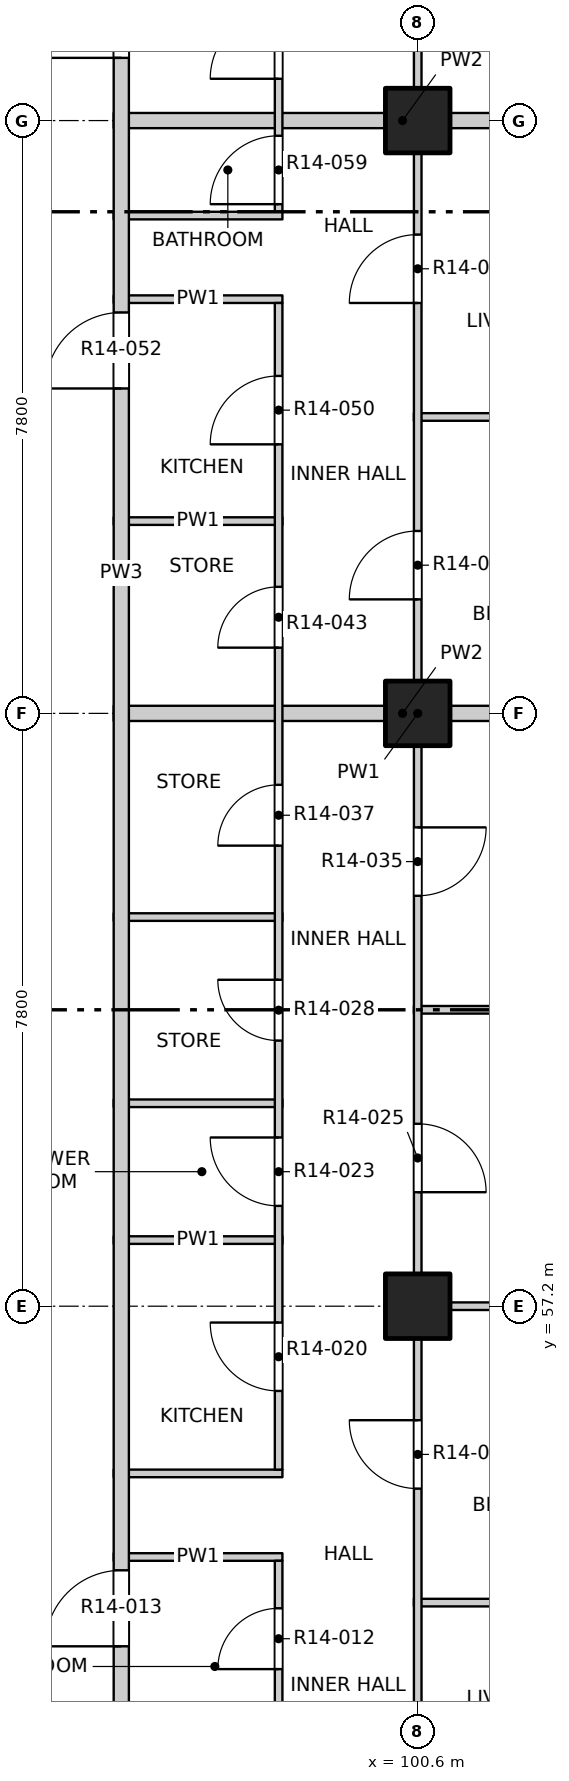
"""IFC4 building model, lengths in metres.
Left out: names, types, materials, properties, quantities, classifications, styles, units other than length and angle.
Written with IfcOpenShell. Run it as: python <this file> out.ifc"""

import sys

from ifc_helpers import new_model, si_unit, direction, frame, frame_2d, origin, origin_2d, place, context, subcontext, project, spatial, rectangle, extrude, element, fill, save


model = new_model("IFC4")
c1 = context("Model", 3, precision=1e-05, world=origin(), true_north=direction((0.0, 1.0)))
c2 = subcontext(c1, "Body", "Model", "MODEL_VIEW")
j1 = project(units=[si_unit("LENGTHUNIT", "METRE"), si_unit("PLANEANGLEUNIT", "RADIAN")], contexts=[c1])
p1 = place(None, origin())
s1 = spatial("IfcSite", under=j1, at=p1, CompositionType="ELEMENT")
p2 = place(p1, origin())
s2 = spatial("IfcBuilding", under=s1, at=p2, CompositionType="ELEMENT")
p3 = place(p2, frame((0.0, 0.0, 152.0)))
s3 = spatial("IfcBuildingStorey", under=s2, at=p3, CompositionType="ELEMENT", Elevation=152.0)
for number, where, z_axis, x_axis in (
    (1, (100.6, 57.2, -0.25), (0.0, 0.0, 1.0), (1.0, 0.0, 0.0)),
    (2, (100.6, 65.0, -0.25), (0.0, 0.0, 1.0), (1.0, 0.0, 0.0)),
    (3, (100.6, 72.8, -0.25), (0.0, 0.0, 1.0), (1.0, 0.0, 0.0)),
):
    element("IfcColumn", number, at=place(p3, frame(where, z_axis=z_axis, x_axis=x_axis)), inside=s3, PredefinedType="COLUMN", context=c2, shape_type="SweptSolid", body=[
        extrude(rectangle(XDim=0.85, YDim=0.85, at=origin_2d()), origin(), (0.0, 0.0, 1.0), 3.4),
    ])
p4 = place(p3, frame((100.55, 53.3, 0.0), z_axis=(0.0, 0.0, 1.0), x_axis=(1.0, 0.0, 0.0)))
e4 = element("IfcWall", 4, at=p4, inside=s3, PredefinedType="PARTITIONING", context=c2, shape_type="SweptSolid", body=[
    extrude(rectangle(XDim=3.65, YDim=0.1, at=frame_2d((1.825, 0.0))), origin(), (0.0, 0.0, 1.0), 3.15),
])
for number, where, z_axis, x_axis in (
    (5, (96.6, 53.9, 0.0), (0.0, 0.0, 1.0), (1.0, 0.0, 0.0)),
    (6, (96.6, 55.0, 0.0), (0.0, 0.0, 1.0), (1.0, 0.0, 0.0)),
):
    element("IfcWall", number, at=place(p3, frame(where, z_axis=z_axis, x_axis=x_axis)), inside=s3, PredefinedType="PARTITIONING", context=c2, shape_type="SweptSolid", body=[
        extrude(rectangle(XDim=2.22, YDim=0.1, at=frame_2d((1.11, 0.0))), origin(), (0.0, 0.0, 1.0), 3.15),
    ])
p5 = place(p3, frame((100.55, 57.2, 0.0), z_axis=(0.0, 0.0, 1.0), x_axis=(1.0, 0.0, 0.0)))
e7 = element("IfcWall", 7, at=p5, inside=s3, PredefinedType="PARTITIONING", context=c2, shape_type="SweptSolid", body=[
    extrude(rectangle(XDim=3.65, YDim=0.1, at=frame_2d((1.825, 0.0))), origin(), (0.0, 0.0, 1.0), 3.15),
])
for number, where, z_axis, x_axis in (
    (8, (96.6, 58.07, 0.0), (0.0, 0.0, 1.0), (1.0, 0.0, 0.0)),
    (9, (96.6, 59.87, 0.0), (0.0, 0.0, 1.0), (1.0, 0.0, 0.0)),
):
    element("IfcWall", number, at=place(p3, frame(where, z_axis=z_axis, x_axis=x_axis)), inside=s3, PredefinedType="PARTITIONING", context=c2, shape_type="SweptSolid", body=[
        extrude(rectangle(XDim=2.22, YDim=0.1, at=frame_2d((1.11, 0.0))), origin(), (0.0, 0.0, 1.0), 3.15),
    ])
p6 = place(p3, frame((100.55, 61.1, 0.0), z_axis=(0.0, 0.0, 1.0), x_axis=(1.0, 0.0, 0.0)))
e10 = element("IfcWall", 10, at=p6, inside=s3, PredefinedType="PARTITIONING", context=c2, shape_type="SweptSolid", body=[
    extrude(rectangle(XDim=3.65, YDim=0.1, at=frame_2d((1.825, 0.0))), origin(), (0.0, 0.0, 1.0), 2.55),
])
p7 = place(p3, frame((96.6, 62.32, 0.0), z_axis=(0.0, 0.0, 1.0), x_axis=(1.0, 0.0, 0.0)))
e11 = element("IfcWall", 11, at=p7, inside=s3, PredefinedType="PARTITIONING", context=c2, shape_type="SweptSolid", body=[
    extrude(rectangle(XDim=2.22, YDim=0.1, at=frame_2d((1.11, 0.0))), origin(), (0.0, 0.0, 1.0), 3.15),
])
p8 = place(p3, frame((96.6, 65.0, 0.0), z_axis=(0.0, 0.0, 1.0), x_axis=(1.0, 0.0, 0.0)))
e12 = element("IfcWall", 12, at=p8, inside=s3, PredefinedType="PARTITIONING", context=c2, shape_type="SweptSolid", body=[
    extrude(rectangle(XDim=7.6, YDim=0.2, at=frame_2d((3.8, 0.0))), origin(), (0.0, 0.0, 1.0), 3.15),
])
p9 = place(p3, frame((96.6, 67.53, 0.0), z_axis=(0.0, 0.0, 1.0), x_axis=(1.0, 0.0, 0.0)))
e13 = element("IfcWall", 13, at=p9, inside=s3, PredefinedType="PARTITIONING", context=c2, shape_type="SweptSolid", body=[
    extrude(rectangle(XDim=2.22, YDim=0.1, at=frame_2d((1.11, 0.0))), origin(), (0.0, 0.0, 1.0), 3.15),
])
p10 = place(p3, frame((100.55, 68.9, 0.0), z_axis=(0.0, 0.0, 1.0), x_axis=(1.0, 0.0, 0.0)))
e14 = element("IfcWall", 14, at=p10, inside=s3, PredefinedType="PARTITIONING", context=c2, shape_type="SweptSolid", body=[
    extrude(rectangle(XDim=3.65, YDim=0.1, at=frame_2d((1.825, 0.0))), origin(), (0.0, 0.0, 1.0), 2.55),
])
for number, where, z_axis, x_axis in (
    (15, (96.6, 70.45, 0.0), (0.0, 0.0, 1.0), (1.0, 0.0, 0.0)),
    (16, (96.6, 71.55, 0.0), (0.0, 0.0, 1.0), (1.0, 0.0, 0.0)),
):
    element("IfcWall", number, at=place(p3, frame(where, z_axis=z_axis, x_axis=x_axis)), inside=s3, PredefinedType="PARTITIONING", context=c2, shape_type="SweptSolid", body=[
        extrude(rectangle(XDim=2.22, YDim=0.1, at=frame_2d((1.11, 0.0))), origin(), (0.0, 0.0, 1.0), 3.15),
    ])
p11 = place(p3, frame((96.6, 72.8, 0.0), z_axis=(0.0, 0.0, 1.0), x_axis=(1.0, 0.0, 0.0)))
e17 = element("IfcWall", 17, at=p11, inside=s3, PredefinedType="PARTITIONING", context=c2, shape_type="SweptSolid", body=[
    extrude(rectangle(XDim=7.6, YDim=0.2, at=frame_2d((3.8, 0.0))), origin(), (0.0, 0.0, 1.0), 3.15),
])
p12 = place(p3, frame((96.7, 49.5, 0.0), z_axis=(0.0, 0.0, 1.0), x_axis=(0.0, 1.0, 0.0)))
e18 = element("IfcWall", 18, at=p12, inside=s3, PredefinedType="PARTITIONING", context=c2, shape_type="SweptSolid", body=[
    extrude(rectangle(XDim=34.7, YDim=0.2, at=frame_2d((17.35, 0.0))), origin(), (0.0, 0.0, 1.0), 3.15),
])
p13 = place(p12, frame((3.225, 0.0, 0.0)))
e19 = element("IfcOpeningElement", 19, at=p13, cuts=e18, PredefinedType="OPENING", context=c2, shape_type="SweptSolid", body=[
    extrude(rectangle(XDim=1.0, YDim=2.1, at=frame_2d((0.5, 1.05))), frame((0.0, 0.11, 0.0), z_axis=(0.0, -1.0, 0.0), x_axis=(1.0, 0.0, 0.0)), (0.0, 0.0, 1.0), 0.22),
])
p14 = place(p12, frame((19.775, 0.0, 0.0)))
e20 = element("IfcOpeningElement", 20, at=p14, cuts=e18, PredefinedType="OPENING", context=c2, shape_type="SweptSolid", body=[
    extrude(rectangle(XDim=1.0, YDim=2.1, at=frame_2d((0.5, 1.05))), frame((0.0, 0.11, 0.0), z_axis=(0.0, -1.0, 0.0), x_axis=(1.0, 0.0, 0.0)), (0.0, 0.0, 1.0), 0.22),
])
p15 = place(p12, frame((24.125, 0.0, 0.0)))
e21 = element("IfcOpeningElement", 21, at=p15, cuts=e18, PredefinedType="OPENING", context=c2, shape_type="SweptSolid", body=[
    extrude(rectangle(XDim=1.0, YDim=2.1, at=frame_2d((0.5, 1.05))), frame((0.0, 0.11, 0.0), z_axis=(0.0, -1.0, 0.0), x_axis=(1.0, 0.0, 0.0)), (0.0, 0.0, 1.0), 0.22),
])
p16 = place(p3, frame((98.77, 49.45, 0.0), z_axis=(0.0, 0.0, 1.0), x_axis=(0.0, 1.0, 0.0)))
e22 = element("IfcWall", 22, at=p16, inside=s3, PredefinedType="PARTITIONING", context=c2, shape_type="SweptSolid", body=[
    extrude(rectangle(XDim=4.4, YDim=0.1, at=frame_2d((2.2, 0.0))), origin(), (0.0, 0.0, 1.0), 3.15),
])
p17 = place(p16, frame((0.675, 0.0, 0.0)))
e23 = element("IfcOpeningElement", 23, at=p17, cuts=e22, PredefinedType="OPENING", context=c2, shape_type="SweptSolid", body=[
    extrude(rectangle(XDim=0.9, YDim=2.1, at=frame_2d((0.45, 1.05))), frame((0.0, 0.06, 0.0), z_axis=(0.0, -1.0, 0.0), x_axis=(1.0, 0.0, 0.0)), (0.0, 0.0, 1.0), 0.12),
])
p18 = place(p16, frame((2.975, 0.0, 0.0)))
e24 = element("IfcOpeningElement", 24, at=p18, cuts=e22, PredefinedType="OPENING", context=c2, shape_type="SweptSolid", body=[
    extrude(rectangle(XDim=0.8, YDim=2.1, at=frame_2d((0.4, 1.05))), frame((0.0, 0.06, 0.0), z_axis=(0.0, -1.0, 0.0), x_axis=(1.0, 0.0, 0.0)), (0.0, 0.0, 1.0), 0.12),
])
p19 = place(p3, frame((98.77, 55.05, 0.0), z_axis=(0.0, 0.0, 1.0), x_axis=(0.0, 1.0, 0.0)))
e25 = element("IfcWall", 25, at=p19, inside=s3, PredefinedType="PARTITIONING", context=c2, shape_type="SweptSolid", body=[
    extrude(rectangle(XDim=15.35, YDim=0.1, at=frame_2d((7.675, 0.0))), origin(), (0.0, 0.0, 1.0), 3.15),
])
p20 = place(p19, frame((1.035, 0.0, 0.0)))
e26 = element("IfcOpeningElement", 26, at=p20, cuts=e25, PredefinedType="OPENING", context=c2, shape_type="SweptSolid", body=[
    extrude(rectangle(XDim=0.9, YDim=2.1, at=frame_2d((0.45, 1.05))), frame((0.0, 0.06, 0.0), z_axis=(0.0, -1.0, 0.0), x_axis=(1.0, 0.0, 0.0)), (0.0, 0.0, 1.0), 0.12),
])
p21 = place(p19, frame((3.47, 0.0, 0.0)))
e27 = element("IfcOpeningElement", 27, at=p21, cuts=e25, PredefinedType="OPENING", context=c2, shape_type="SweptSolid", body=[
    extrude(rectangle(XDim=0.9, YDim=2.1, at=frame_2d((0.45, 1.05))), frame((0.0, 0.06, 0.0), z_axis=(0.0, -1.0, 0.0), x_axis=(1.0, 0.0, 0.0)), (0.0, 0.0, 1.0), 0.12),
])
p22 = place(p19, frame((5.645, 0.0, 0.0)))
e28 = element("IfcOpeningElement", 28, at=p22, cuts=e25, PredefinedType="OPENING", context=c2, shape_type="SweptSolid", body=[
    extrude(rectangle(XDim=0.8, YDim=2.1, at=frame_2d((0.4, 1.05))), frame((0.0, 0.06, 0.0), z_axis=(0.0, -1.0, 0.0), x_axis=(1.0, 0.0, 0.0)), (0.0, 0.0, 1.0), 0.12),
])
p23 = place(p19, frame((8.21, 0.0, 0.0)))
e29 = element("IfcOpeningElement", 29, at=p23, cuts=e25, PredefinedType="OPENING", context=c2, shape_type="SweptSolid", body=[
    extrude(rectangle(XDim=0.8, YDim=2.1, at=frame_2d((0.4, 1.05))), frame((0.0, 0.06, 0.0), z_axis=(0.0, -1.0, 0.0), x_axis=(1.0, 0.0, 0.0)), (0.0, 0.0, 1.0), 0.12),
])
p24 = place(p19, frame((10.815, 0.0, 0.0)))
e30 = element("IfcOpeningElement", 30, at=p24, cuts=e25, PredefinedType="OPENING", context=c2, shape_type="SweptSolid", body=[
    extrude(rectangle(XDim=0.8, YDim=2.1, at=frame_2d((0.4, 1.05))), frame((0.0, 0.06, 0.0), z_axis=(0.0, -1.0, 0.0), x_axis=(1.0, 0.0, 0.0)), (0.0, 0.0, 1.0), 0.12),
])
p25 = place(p19, frame((13.49, 0.0, 0.0)))
e31 = element("IfcOpeningElement", 31, at=p25, cuts=e25, PredefinedType="OPENING", context=c2, shape_type="SweptSolid", body=[
    extrude(rectangle(XDim=0.9, YDim=2.1, at=frame_2d((0.45, 1.05))), frame((0.0, 0.06, 0.0), z_axis=(0.0, -1.0, 0.0), x_axis=(1.0, 0.0, 0.0)), (0.0, 0.0, 1.0), 0.12),
])
p26 = place(p3, frame((98.77, 71.6, 0.0), z_axis=(0.0, 0.0, 1.0), x_axis=(0.0, 1.0, 0.0)))
e32 = element("IfcWall", 32, at=p26, inside=s3, PredefinedType="PARTITIONING", context=c2, shape_type="SweptSolid", body=[
    extrude(rectangle(XDim=3.15, YDim=0.1, at=frame_2d((1.575, 0.0))), origin(), (0.0, 0.0, 1.0), 3.15),
])
p27 = place(p26, frame((0.1, 0.0, 0.0)))
e33 = element("IfcOpeningElement", 33, at=p27, cuts=e32, PredefinedType="OPENING", context=c2, shape_type="SweptSolid", body=[
    extrude(rectangle(XDim=0.9, YDim=2.1, at=frame_2d((0.45, 1.05))), frame((0.0, 0.06, 0.0), z_axis=(0.0, -1.0, 0.0), x_axis=(1.0, 0.0, 0.0)), (0.0, 0.0, 1.0), 0.12),
])
p28 = place(p26, frame((1.75, 0.0, 0.0)))
e34 = element("IfcOpeningElement", 34, at=p28, cuts=e32, PredefinedType="OPENING", context=c2, shape_type="SweptSolid", body=[
    extrude(rectangle(XDim=0.9, YDim=2.1, at=frame_2d((0.45, 1.05))), frame((0.0, 0.06, 0.0), z_axis=(0.0, -1.0, 0.0), x_axis=(1.0, 0.0, 0.0)), (0.0, 0.0, 1.0), 0.12),
])
p29 = place(p3, frame((100.6, 45.8, 0.0), z_axis=(0.0, 0.0, 1.0), x_axis=(0.0, 1.0, 0.0)))
e35 = element("IfcWall", 35, at=p29, inside=s3, PredefinedType="PARTITIONING", context=c2, shape_type="SweptSolid", body=[
    extrude(rectangle(XDim=38.4, YDim=0.1, at=frame_2d((19.2, 0.0))), origin(), (0.0, 0.0, 1.0), 3.15),
])
p30 = place(p29, frame((1.05, 0.0, 0.0)))
e36 = element("IfcOpeningElement", 36, at=p30, cuts=e35, PredefinedType="OPENING", context=c2, shape_type="SweptSolid", body=[
    extrude(rectangle(XDim=1.2, YDim=2.1, at=frame_2d((0.6, 1.05))), frame((0.0, 0.06, 0.0), z_axis=(0.0, -1.0, 0.0), x_axis=(1.0, 0.0, 0.0)), (0.0, 0.0, 1.0), 0.12),
])
p31 = place(p29, frame((5.1, 0.0, 0.0)))
e37 = element("IfcOpeningElement", 37, at=p31, cuts=e35, PredefinedType="OPENING", context=c2, shape_type="SweptSolid", body=[
    extrude(rectangle(XDim=0.9, YDim=2.1, at=frame_2d((0.45, 1.05))), frame((0.0, 0.06, 0.0), z_axis=(0.0, -1.0, 0.0), x_axis=(1.0, 0.0, 0.0)), (0.0, 0.0, 1.0), 0.12),
])
p32 = place(p29, frame((9.0, 0.0, 0.0)))
e38 = element("IfcOpeningElement", 38, at=p32, cuts=e35, PredefinedType="OPENING", context=c2, shape_type="SweptSolid", body=[
    extrude(rectangle(XDim=0.9, YDim=2.1, at=frame_2d((0.45, 1.05))), frame((0.0, 0.06, 0.0), z_axis=(0.0, -1.0, 0.0), x_axis=(1.0, 0.0, 0.0)), (0.0, 0.0, 1.0), 0.12),
])
p33 = place(p29, frame((12.9, 0.0, 0.0)))
e39 = element("IfcOpeningElement", 39, at=p33, cuts=e35, PredefinedType="OPENING", context=c2, shape_type="SweptSolid", body=[
    extrude(rectangle(XDim=0.9, YDim=2.1, at=frame_2d((0.45, 1.05))), frame((0.0, 0.06, 0.0), z_axis=(0.0, -1.0, 0.0), x_axis=(1.0, 0.0, 0.0)), (0.0, 0.0, 1.0), 0.12),
])
p34 = place(p29, frame((16.8, 0.0, 0.0)))
e40 = element("IfcOpeningElement", 40, at=p34, cuts=e35, PredefinedType="OPENING", context=c2, shape_type="SweptSolid", body=[
    extrude(rectangle(XDim=0.9, YDim=2.1, at=frame_2d((0.45, 1.05))), frame((0.0, 0.06, 0.0), z_axis=(0.0, -1.0, 0.0), x_axis=(1.0, 0.0, 0.0)), (0.0, 0.0, 1.0), 0.12),
])
p35 = place(p29, frame((20.7, 0.0, 0.0)))
e41 = element("IfcOpeningElement", 41, at=p35, cuts=e35, PredefinedType="OPENING", context=c2, shape_type="SweptSolid", body=[
    extrude(rectangle(XDim=0.9, YDim=2.1, at=frame_2d((0.45, 1.05))), frame((0.0, 0.06, 0.0), z_axis=(0.0, -1.0, 0.0), x_axis=(1.0, 0.0, 0.0)), (0.0, 0.0, 1.0), 0.12),
])
p36 = place(p29, frame((24.6, 0.0, 0.0)))
e42 = element("IfcOpeningElement", 42, at=p36, cuts=e35, PredefinedType="OPENING", context=c2, shape_type="SweptSolid", body=[
    extrude(rectangle(XDim=0.9, YDim=2.1, at=frame_2d((0.45, 1.05))), frame((0.0, 0.06, 0.0), z_axis=(0.0, -1.0, 0.0), x_axis=(1.0, 0.0, 0.0)), (0.0, 0.0, 1.0), 0.12),
])
p37 = place(p29, frame((28.5, 0.0, 0.0)))
e43 = element("IfcOpeningElement", 43, at=p37, cuts=e35, PredefinedType="OPENING", context=c2, shape_type="SweptSolid", body=[
    extrude(rectangle(XDim=0.9, YDim=2.1, at=frame_2d((0.45, 1.05))), frame((0.0, 0.06, 0.0), z_axis=(0.0, -1.0, 0.0), x_axis=(1.0, 0.0, 0.0)), (0.0, 0.0, 1.0), 0.12),
])
p38 = place(p29, frame((32.4, 0.0, 0.0)))
e44 = element("IfcOpeningElement", 44, at=p38, cuts=e35, PredefinedType="OPENING", context=c2, shape_type="SweptSolid", body=[
    extrude(rectangle(XDim=0.9, YDim=2.1, at=frame_2d((0.45, 1.05))), frame((0.0, 0.06, 0.0), z_axis=(0.0, -1.0, 0.0), x_axis=(1.0, 0.0, 0.0)), (0.0, 0.0, 1.0), 0.12),
])
p39 = place(p29, frame((36.15, 0.0, 0.0)))
e45 = element("IfcOpeningElement", 45, at=p39, cuts=e35, PredefinedType="OPENING", context=c2, shape_type="SweptSolid", body=[
    extrude(rectangle(XDim=1.2, YDim=2.1, at=frame_2d((0.6, 1.05))), frame((0.0, 0.06, 0.0), z_axis=(0.0, -1.0, 0.0), x_axis=(1.0, 0.0, 0.0)), (0.0, 0.0, 1.0), 0.12),
])
p40 = place(p18, origin())
e46 = element("IfcDoor", 46, at=p40, inside=s3, OperationType="SINGLE_SWING_LEFT", PredefinedType="DOOR", context=c2, shape_type="SweptSolid", body=[
    extrude(rectangle(XDim=0.8, YDim=2.1, at=frame_2d((0.4, 1.05))), frame((0.0, 0.025, 0.0), z_axis=(0.0, -1.0, 0.0), x_axis=(1.0, 0.0, 0.0)), (0.0, 0.0, 1.0), 0.05),
])
fill(e24, e46)
p41 = place(p13, origin())
e47 = element("IfcDoor", 47, at=p41, inside=s3, OperationType="SINGLE_SWING_RIGHT", PredefinedType="DOOR", context=c2, shape_type="SweptSolid", body=[
    extrude(rectangle(XDim=1.0, YDim=2.1, at=frame_2d((0.5, 1.05))), frame((0.0, 0.025, 0.0), z_axis=(0.0, -1.0, 0.0), x_axis=(1.0, 0.0, 0.0)), (0.0, 0.0, 1.0), 0.05),
])
fill(e19, e47)
p42 = place(p32, origin())
e48 = element("IfcDoor", 48, at=p42, inside=s3, OperationType="SINGLE_SWING_RIGHT", PredefinedType="DOOR", context=c2, shape_type="SweptSolid", body=[
    extrude(rectangle(XDim=0.9, YDim=2.1, at=frame_2d((0.45, 1.05))), frame((0.0, 0.025, 0.0), z_axis=(0.0, -1.0, 0.0), x_axis=(1.0, 0.0, 0.0)), (0.0, 0.0, 1.0), 0.05),
])
fill(e38, e48)
p43 = place(p20, origin())
e49 = element("IfcDoor", 49, at=p43, inside=s3, OperationType="SINGLE_SWING_RIGHT", PredefinedType="DOOR", context=c2, shape_type="SweptSolid", body=[
    extrude(rectangle(XDim=0.9, YDim=2.1, at=frame_2d((0.45, 1.05))), frame((0.0, 0.025, 0.0), z_axis=(0.0, -1.0, 0.0), x_axis=(1.0, 0.0, 0.0)), (0.0, 0.0, 1.0), 0.05),
])
fill(e26, e49)
p44 = place(p21, origin())
e50 = element("IfcDoor", 50, at=p44, inside=s3, OperationType="SINGLE_SWING_RIGHT", PredefinedType="DOOR", context=c2, shape_type="SweptSolid", body=[
    extrude(rectangle(XDim=0.9, YDim=2.1, at=frame_2d((0.45, 1.05))), frame((0.0, 0.025, 0.0), z_axis=(0.0, -1.0, 0.0), x_axis=(1.0, 0.0, 0.0)), (0.0, 0.0, 1.0), 0.05),
])
fill(e27, e50)
p45 = place(p33, origin())
e51 = element("IfcDoor", 51, at=p45, inside=s3, OperationType="SINGLE_SWING_RIGHT", PredefinedType="DOOR", context=c2, shape_type="SweptSolid", body=[
    extrude(rectangle(XDim=0.9, YDim=2.1, at=frame_2d((0.45, 1.05))), frame((0.0, 0.025, 0.0), z_axis=(0.0, -1.0, 0.0), x_axis=(1.0, 0.0, 0.0)), (0.0, 0.0, 1.0), 0.05),
])
fill(e39, e51)
p46 = place(p22, origin())
e52 = element("IfcDoor", 52, at=p46, inside=s3, OperationType="SINGLE_SWING_RIGHT", PredefinedType="DOOR", context=c2, shape_type="SweptSolid", body=[
    extrude(rectangle(XDim=0.8, YDim=2.1, at=frame_2d((0.4, 1.05))), frame((0.0, 0.025, 0.0), z_axis=(0.0, -1.0, 0.0), x_axis=(1.0, 0.0, 0.0)), (0.0, 0.0, 1.0), 0.05),
])
fill(e28, e52)
p47 = place(p34, origin())
e53 = element("IfcDoor", 53, at=p47, inside=s3, OperationType="SINGLE_SWING_LEFT", PredefinedType="DOOR", context=c2, shape_type="SweptSolid", body=[
    extrude(rectangle(XDim=0.9, YDim=2.1, at=frame_2d((0.45, 1.05))), frame((0.0, 0.025, 0.0), z_axis=(0.0, -1.0, 0.0), x_axis=(1.0, 0.0, 0.0)), (0.0, 0.0, 1.0), 0.05),
])
fill(e40, e53)
p48 = place(p23, origin())
e54 = element("IfcDoor", 54, at=p48, inside=s3, OperationType="SINGLE_SWING_LEFT", PredefinedType="DOOR", context=c2, shape_type="SweptSolid", body=[
    extrude(rectangle(XDim=0.8, YDim=2.1, at=frame_2d((0.4, 1.05))), frame((0.0, 0.025, 0.0), z_axis=(0.0, -1.0, 0.0), x_axis=(1.0, 0.0, 0.0)), (0.0, 0.0, 1.0), 0.05),
])
fill(e29, e54)
p49 = place(p24, origin())
e55 = element("IfcDoor", 55, at=p49, inside=s3, OperationType="SINGLE_SWING_LEFT", PredefinedType="DOOR", context=c2, shape_type="SweptSolid", body=[
    extrude(rectangle(XDim=0.8, YDim=2.1, at=frame_2d((0.4, 1.05))), frame((0.0, 0.025, 0.0), z_axis=(0.0, -1.0, 0.0), x_axis=(1.0, 0.0, 0.0)), (0.0, 0.0, 1.0), 0.05),
])
fill(e30, e55)
p50 = place(p35, origin())
e56 = element("IfcDoor", 56, at=p50, inside=s3, OperationType="SINGLE_SWING_LEFT", PredefinedType="DOOR", context=c2, shape_type="SweptSolid", body=[
    extrude(rectangle(XDim=0.9, YDim=2.1, at=frame_2d((0.45, 1.05))), frame((0.0, 0.025, 0.0), z_axis=(0.0, -1.0, 0.0), x_axis=(1.0, 0.0, 0.0)), (0.0, 0.0, 1.0), 0.05),
])
fill(e41, e56)
p51 = place(p25, origin())
e57 = element("IfcDoor", 57, at=p51, inside=s3, OperationType="SINGLE_SWING_LEFT", PredefinedType="DOOR", context=c2, shape_type="SweptSolid", body=[
    extrude(rectangle(XDim=0.9, YDim=2.1, at=frame_2d((0.45, 1.05))), frame((0.0, 0.025, 0.0), z_axis=(0.0, -1.0, 0.0), x_axis=(1.0, 0.0, 0.0)), (0.0, 0.0, 1.0), 0.05),
])
fill(e31, e57)
p52 = place(p14, origin())
e58 = element("IfcDoor", 58, at=p52, inside=s3, OperationType="SINGLE_SWING_RIGHT", PredefinedType="DOOR", context=c2, shape_type="SweptSolid", body=[
    extrude(rectangle(XDim=1.0, YDim=2.1, at=frame_2d((0.5, 1.05))), frame((0.0, 0.025, 0.0), z_axis=(0.0, -1.0, 0.0), x_axis=(1.0, 0.0, 0.0)), (0.0, 0.0, 1.0), 0.05),
])
fill(e20, e58)
p53 = place(p36, origin())
e59 = element("IfcDoor", 59, at=p53, inside=s3, OperationType="SINGLE_SWING_LEFT", PredefinedType="DOOR", context=c2, shape_type="SweptSolid", body=[
    extrude(rectangle(XDim=0.9, YDim=2.1, at=frame_2d((0.45, 1.05))), frame((0.0, 0.025, 0.0), z_axis=(0.0, -1.0, 0.0), x_axis=(1.0, 0.0, 0.0)), (0.0, 0.0, 1.0), 0.05),
])
fill(e42, e59)
p54 = place(p27, origin())
e60 = element("IfcDoor", 60, at=p54, inside=s3, OperationType="SINGLE_SWING_LEFT", PredefinedType="DOOR", context=c2, shape_type="SweptSolid", body=[
    extrude(rectangle(XDim=0.9, YDim=2.1, at=frame_2d((0.45, 1.05))), frame((0.0, 0.025, 0.0), z_axis=(0.0, -1.0, 0.0), x_axis=(1.0, 0.0, 0.0)), (0.0, 0.0, 1.0), 0.05),
])
fill(e33, e60)
p55 = place(p28, origin())
e61 = element("IfcDoor", 61, at=p55, inside=s3, OperationType="SINGLE_SWING_LEFT", PredefinedType="DOOR", context=c2, shape_type="SweptSolid", body=[
    extrude(rectangle(XDim=0.9, YDim=2.1, at=frame_2d((0.45, 1.05))), frame((0.0, 0.025, 0.0), z_axis=(0.0, -1.0, 0.0), x_axis=(1.0, 0.0, 0.0)), (0.0, 0.0, 1.0), 0.05),
])
fill(e34, e61)
p56 = place(p15, origin())
e62 = element("IfcDoor", 62, at=p56, inside=s3, OperationType="SINGLE_SWING_RIGHT", PredefinedType="DOOR", context=c2, shape_type="SweptSolid", body=[
    extrude(rectangle(XDim=1.0, YDim=2.1, at=frame_2d((0.5, 1.05))), frame((0.0, 0.025, 0.0), z_axis=(0.0, -1.0, 0.0), x_axis=(1.0, 0.0, 0.0)), (0.0, 0.0, 1.0), 0.05),
])
fill(e21, e62)
save(model, sys.argv[1])
